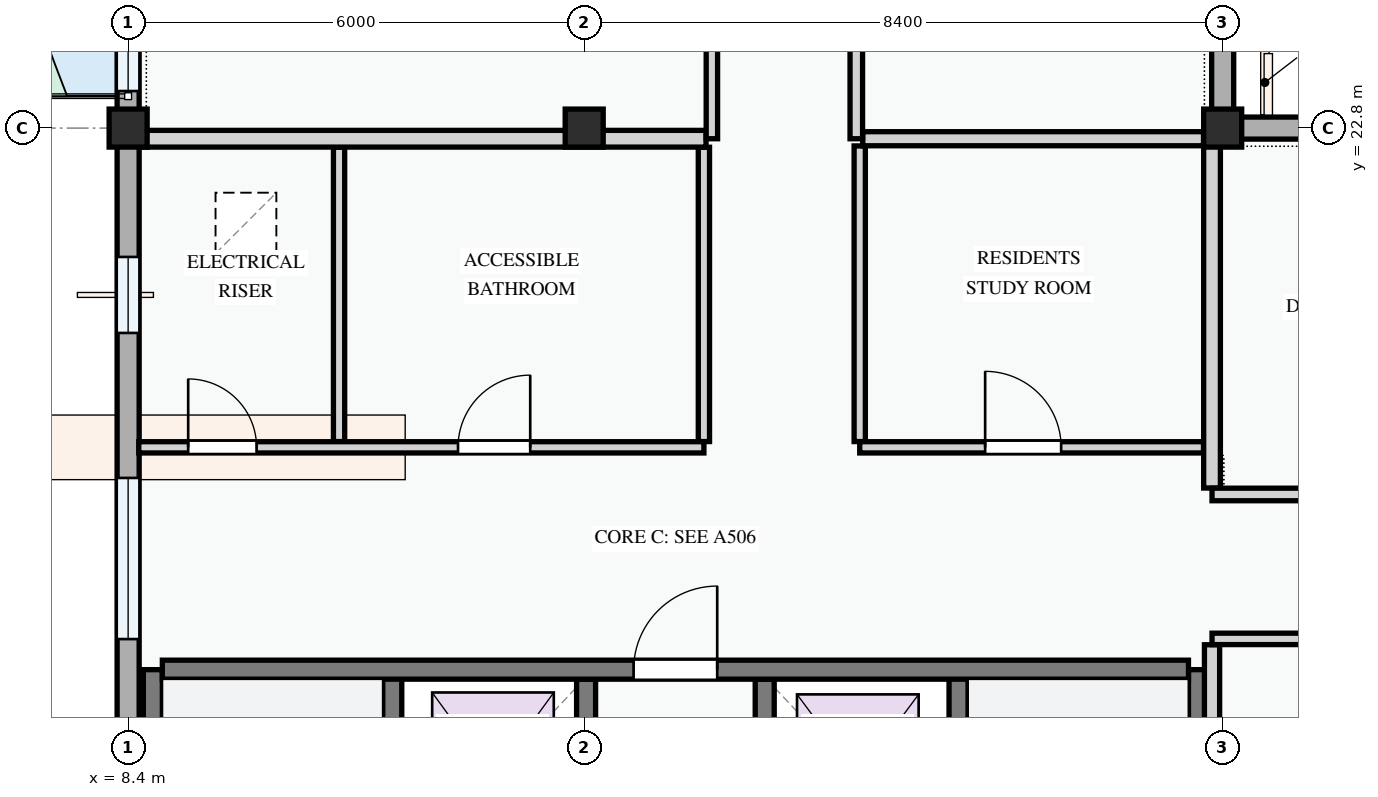
"""IFC4 building model, lengths in metres.
Left out: names, types, materials, properties, quantities, classifications, styles, units other than length and angle.
Written with IfcOpenShell. Run it as: python <this file> out.ifc"""

import sys

from ifc_helpers import new_model, si_unit, direction, frame, frame_2d, origin, origin_2d, place, context, subcontext, project, spatial, rectangle, extrude, element, fill, save


model = new_model("IFC4")
c1 = context("Model", 3, precision=1e-05, world=origin(), true_north=direction((0.0, 1.0)))
c2 = subcontext(c1, "Body", "Model", "MODEL_VIEW")
j1 = project(units=[si_unit("LENGTHUNIT", "METRE"), si_unit("PLANEANGLEUNIT", "RADIAN")], contexts=[c1])
p1 = place(None, origin())
s1 = spatial("IfcSite", under=j1, at=p1, CompositionType="ELEMENT")
p2 = place(p1, origin())
s2 = spatial("IfcBuilding", under=s1, at=p2, CompositionType="ELEMENT")
p3 = place(p2, frame((0.0, 0.0, 21.3)))
s3 = spatial("IfcBuildingStorey", under=s2, at=p3, CompositionType="ELEMENT", Elevation=21.3)
for number, where, z_axis, x_axis in (
    (1, (8.4, 22.8, 0.0), (0.0, 0.0, 1.0), (1.0, 0.0, 0.0)),
    (2, (14.4, 22.8, 0.0), (0.0, 0.0, 1.0), (1.0, 0.0, 0.0)),
    (3, (22.8, 22.8, 0.0), (0.0, 0.0, 1.0), (1.0, 0.0, 0.0)),
):
    element("IfcColumn", number, at=place(p3, frame(where, z_axis=z_axis, x_axis=x_axis)), inside=s3, PredefinedType="COLUMN", context=c2, shape_type="SweptSolid", body=[
        extrude(rectangle(XDim=0.5, YDim=0.5, at=origin_2d()), origin(), (0.0, 0.0, 1.0), 3.3),
    ])
p4 = place(p3, frame((22.8, 22.8, 0.0), z_axis=(0.0, 0.0, 1.0), x_axis=(0.0, 1.0, 0.0)))
e4 = element("IfcWall", 4, at=p4, inside=s3, PredefinedType="STANDARD", context=c2, shape_type="SweptSolid", body=[
    extrude(rectangle(XDim=6.0, YDim=0.29, at=frame_2d((3.0, 0.0))), origin(), (0.0, 0.0, 1.0), 2.575),
])
p5 = place(p4, frame((1.745, 0.0, 0.78)))
e5 = element("IfcOpeningElement", 5, at=p5, cuts=e4, PredefinedType="OPENING", context=c2, shape_type="SweptSolid", body=[
    extrude(rectangle(XDim=0.95, YDim=1.15, at=frame_2d((0.475, 0.575))), frame((0.0, 0.155, 0.0), z_axis=(0.0, -1.0, 0.0), x_axis=(1.0, 0.0, 0.0)), (0.0, 0.0, 1.0), 0.31),
])
p6 = place(p4, frame((4.53, 0.0, 0.78)))
e6 = element("IfcOpeningElement", 6, at=p6, cuts=e4, PredefinedType="OPENING", context=c2, shape_type="SweptSolid", body=[
    extrude(rectangle(XDim=1.0, YDim=1.25, at=frame_2d((0.5, 0.625))), frame((0.0, 0.155, 0.0), z_axis=(0.0, -1.0, 0.0), x_axis=(1.0, 0.0, 0.0)), (0.0, 0.0, 1.0), 0.31),
])
p7 = place(p3, frame((8.4, 28.8, 0.0), z_axis=(0.0, 0.0, 1.0), x_axis=(0.0, -1.0, 0.0)))
e7 = element("IfcWall", 7, at=p7, inside=s3, PredefinedType="STANDARD", context=c2, shape_type="SweptSolid", body=[
    extrude(rectangle(XDim=6.0, YDim=0.29, at=frame_2d((3.0, 0.0))), origin(), (0.0, 0.0, 1.0), 2.445),
])
p8 = place(p7, frame((2.085, 0.0, 0.0)))
e8 = element("IfcOpeningElement", 8, at=p8, cuts=e7, PredefinedType="OPENING", context=c2, shape_type="SweptSolid", body=[
    extrude(rectangle(XDim=1.6, YDim=2.2, at=frame_2d((0.8, 1.1))), frame((0.0, 0.155, 0.0), z_axis=(0.0, -1.0, 0.0), x_axis=(1.0, 0.0, 0.0)), (0.0, 0.0, 1.0), 0.31),
])
p9 = place(p7, frame((0.522, 0.0, 0.78)))
e9 = element("IfcOpeningElement", 9, at=p9, cuts=e7, PredefinedType="OPENING", context=c2, shape_type="SweptSolid", body=[
    extrude(rectangle(XDim=0.9, YDim=1.2, at=frame_2d((0.45, 0.6))), frame((0.0, 0.155, 0.0), z_axis=(0.0, -1.0, 0.0), x_axis=(1.0, 0.0, 0.0)), (0.0, 0.0, 1.0), 0.31),
])
p10 = place(p7, frame((4.032, 0.0, 0.78)))
e10 = element("IfcOpeningElement", 10, at=p10, cuts=e7, PredefinedType="OPENING", context=c2, shape_type="SweptSolid", body=[
    extrude(rectangle(XDim=1.48, YDim=1.52, at=frame_2d((0.74, 0.76))), frame((0.0, 0.155, 0.0), z_axis=(0.0, -1.0, 0.0), x_axis=(1.0, 0.0, 0.0)), (0.0, 0.0, 1.0), 0.31),
])
p11 = place(p3, frame((8.4, 22.8, 0.0), z_axis=(0.0, 0.0, 1.0), x_axis=(0.0, -1.0, 0.0)))
e11 = element("IfcWall", 11, at=p11, inside=s3, PredefinedType="STANDARD", context=c2, shape_type="SweptSolid", body=[
    extrude(rectangle(XDim=8.4, YDim=0.29, at=frame_2d((4.2, 0.0))), origin(), (0.0, 0.0, 1.0), 2.345),
])
p12 = place(p11, frame((1.695, 0.0, 0.78)))
e12 = element("IfcOpeningElement", 12, at=p12, cuts=e11, PredefinedType="OPENING", context=c2, shape_type="SweptSolid", body=[
    extrude(rectangle(XDim=1.0, YDim=1.25, at=frame_2d((0.5, 0.625))), frame((0.0, 0.155, 0.0), z_axis=(0.0, -1.0, 0.0), x_axis=(1.0, 0.0, 0.0)), (0.0, 0.0, 1.0), 0.31),
])
p13 = place(p11, frame((4.603, 0.0, 0.78)))
e13 = element("IfcOpeningElement", 13, at=p13, cuts=e11, PredefinedType="OPENING", context=c2, shape_type="SweptSolid", body=[
    extrude(rectangle(XDim=2.12, YDim=1.44, at=frame_2d((1.06, 0.72))), frame((0.0, 0.155, 0.0), z_axis=(0.0, -1.0, 0.0), x_axis=(1.0, 0.0, 0.0)), (0.0, 0.0, 1.0), 0.31),
])
p14 = place(p3, frame((28.8, 22.8, 0.0), z_axis=(0.0, 0.0, 1.0), x_axis=(-1.0, 0.0, 0.0)))
e14 = element("IfcWall", 14, at=p14, inside=s3, PredefinedType="STANDARD", context=c2, shape_type="SweptSolid", body=[
    extrude(rectangle(XDim=6.0, YDim=0.29, at=frame_2d((3.0, 0.0))), origin(), (0.0, 0.0, 1.0), 2.475),
])
p15 = place(p14, frame((0.495, 0.0, 0.78)))
e15 = element("IfcOpeningElement", 15, at=p15, cuts=e14, PredefinedType="OPENING", context=c2, shape_type="SweptSolid", body=[
    extrude(rectangle(XDim=0.95, YDim=1.15, at=frame_2d((0.475, 0.575))), frame((0.0, 0.155, 0.0), z_axis=(0.0, -1.0, 0.0), x_axis=(1.0, 0.0, 0.0)), (0.0, 0.0, 1.0), 0.31),
])
p16 = place(p14, frame((3.205, 0.0, 0.78)))
e16 = element("IfcOpeningElement", 16, at=p16, cuts=e14, PredefinedType="OPENING", context=c2, shape_type="SweptSolid", body=[
    extrude(rectangle(XDim=1.15, YDim=1.25, at=frame_2d((0.575, 0.625))), frame((0.0, 0.155, 0.0), z_axis=(0.0, -1.0, 0.0), x_axis=(1.0, 0.0, 0.0)), (0.0, 0.0, 1.0), 0.31),
])
p17 = place(p3, frame((11.875, 8.75, 0.0), z_axis=(0.0, 0.0, 1.0), x_axis=(0.0, 1.0, 0.0)))
e17 = element("IfcWall", 17, at=p17, inside=s3, PredefinedType="SHEAR", context=c2, shape_type="SweptSolid", body=[
    extrude(rectangle(XDim=6.925, YDim=0.25, at=frame_2d((3.462, 0.0))), origin(), (0.0, 0.0, 1.0), 3.0),
])
p18 = place(p17, frame((0.35, 0.0, 0.0)))
e18 = element("IfcOpeningElement", 18, at=p18, cuts=e17, PredefinedType="OPENING", context=c2, shape_type="SweptSolid", body=[
    extrude(rectangle(XDim=0.95, YDim=2.1, at=frame_2d((0.475, 1.05))), frame((0.0, 0.135, 0.0), z_axis=(0.0, -1.0, 0.0), x_axis=(1.0, 0.0, 0.0)), (0.0, 0.0, 1.0), 0.27),
])
p19 = place(p3, frame((8.725, 8.6, 0.0), z_axis=(0.0, 0.0, 1.0), x_axis=(0.0, 1.0, 0.0)))
e19 = element("IfcWall", 19, at=p19, inside=s3, PredefinedType="SHEAR", context=c2, shape_type="SweptSolid", body=[
    extrude(rectangle(XDim=7.075, YDim=0.25, at=frame_2d((3.538, 0.0))), origin(), (0.0, 0.0, 1.0), 3.0),
])
p20 = place(p3, frame((22.475, 8.75, 0.0), z_axis=(0.0, 0.0, 1.0), x_axis=(0.0, 1.0, 0.0)))
e20 = element("IfcWall", 20, at=p20, inside=s3, PredefinedType="SHEAR", context=c2, shape_type="SweptSolid", body=[
    extrude(rectangle(XDim=6.925, YDim=0.25, at=frame_2d((3.462, 0.0))), origin(), (0.0, 0.0, 1.0), 3.0),
])
p21 = place(p3, frame((19.325, 8.75, 0.0), z_axis=(0.0, 0.0, 1.0), x_axis=(0.0, 1.0, 0.0)))
e21 = element("IfcWall", 21, at=p21, inside=s3, PredefinedType="SHEAR", context=c2, shape_type="SweptSolid", body=[
    extrude(rectangle(XDim=6.925, YDim=0.25, at=frame_2d((3.462, 0.0))), origin(), (0.0, 0.0, 1.0), 3.0),
])
p22 = place(p21, frame((0.35, 0.0, 0.0)))
e22 = element("IfcOpeningElement", 22, at=p22, cuts=e21, PredefinedType="OPENING", context=c2, shape_type="SweptSolid", body=[
    extrude(rectangle(XDim=0.95, YDim=2.1, at=frame_2d((0.475, 1.05))), frame((0.0, 0.135, 0.0), z_axis=(0.0, -1.0, 0.0), x_axis=(1.0, 0.0, 0.0)), (0.0, 0.0, 1.0), 0.27),
])
for number, where, z_axis, x_axis in (
    (23, (14.425, 13.125, 0.0), (0.0, 0.0, 1.0), (0.0, 1.0, 0.0)),
    (24, (16.775, 13.125, 0.0), (0.0, 0.0, 1.0), (0.0, 1.0, 0.0)),
):
    element("IfcWall", number, at=place(p3, frame(where, z_axis=z_axis, x_axis=x_axis)), inside=s3, PredefinedType="SHEAR", context=c2, shape_type="SweptSolid", body=[
        extrude(rectangle(XDim=2.425, YDim=0.25, at=frame_2d((1.212, 0.0))), origin(), (0.0, 0.0, 1.0), 3.0),
    ])
p23 = place(p3, frame((8.85, 15.675, 0.0), z_axis=(0.0, 0.0, 1.0), x_axis=(1.0, 0.0, 0.0)))
e25 = element("IfcWall", 25, at=p23, inside=s3, PredefinedType="SHEAR", context=c2, shape_type="SweptSolid", body=[
    extrude(rectangle(XDim=13.5, YDim=0.25, at=frame_2d((6.75, 0.0))), origin(), (0.0, 0.0, 1.0), 3.0),
])
p24 = place(p23, frame((6.2, 0.0, 0.0)))
e26 = element("IfcOpeningElement", 26, at=p24, cuts=e25, PredefinedType="OPENING", context=c2, shape_type="SweptSolid", body=[
    extrude(rectangle(XDim=1.1, YDim=2.15, at=frame_2d((0.55, 1.075))), frame((0.0, 0.135, 0.0), z_axis=(0.0, -1.0, 0.0), x_axis=(1.0, 0.0, 0.0)), (0.0, 0.0, 1.0), 0.27),
])
for number, where, z_axis, x_axis in (
    (27, (11.175, 18.676, 0.0), (0.0, 0.0, 1.0), (0.0, 1.0, 0.0)),
    (28, (15.975, 18.676, 0.0), (0.0, 0.0, 1.0), (0.0, 1.0, 0.0)),
):
    element("IfcWall", number, at=place(p3, frame(where, z_axis=z_axis, x_axis=x_axis)), inside=s3, PredefinedType="PARTITIONING", context=c2, shape_type="SweptSolid", body=[
        extrude(rectangle(XDim=3.872, YDim=0.148, at=frame_2d((1.936, 0.0))), origin(), (0.0, 0.0, 1.0), 3.0),
    ])
p25 = place(p3, frame((18.025, 18.676, 0.0), z_axis=(0.0, 0.0, 1.0), x_axis=(0.0, 1.0, 0.0)))
e29 = element("IfcWall", 29, at=p25, inside=s3, PredefinedType="PARTITIONING", context=c2, shape_type="SweptSolid", body=[
    extrude(rectangle(XDim=3.889, YDim=0.148, at=frame_2d((1.945, 0.0))), origin(), (0.0, 0.0, 1.0), 3.0),
])
p26 = place(p3, frame((8.54, 18.6, 0.0), z_axis=(0.0, 0.0, 1.0), x_axis=(1.0, 0.0, 0.0)))
e30 = element("IfcWall", 30, at=p26, inside=s3, PredefinedType="PARTITIONING", context=c2, shape_type="SweptSolid", body=[
    extrude(rectangle(XDim=7.435, YDim=0.148, at=frame_2d((3.718, 0.0))), origin(), (0.0, 0.0, 1.0), 3.0),
])
p27 = place(p26, frame((0.65, 0.0, 0.0)))
e31 = element("IfcOpeningElement", 31, at=p27, cuts=e30, PredefinedType="OPENING", context=c2, shape_type="SweptSolid", body=[
    extrude(rectangle(XDim=0.9, YDim=2.1, at=frame_2d((0.45, 1.05))), frame((0.0, 0.084, 0.0), z_axis=(0.0, -1.0, 0.0), x_axis=(1.0, 0.0, 0.0)), (0.0, 0.0, 1.0), 0.168),
])
p28 = place(p26, frame((4.2, 0.0, 0.0)))
e32 = element("IfcOpeningElement", 32, at=p28, cuts=e30, PredefinedType="OPENING", context=c2, shape_type="SweptSolid", body=[
    extrude(rectangle(XDim=0.95, YDim=2.1, at=frame_2d((0.475, 1.05))), frame((0.0, 0.084, 0.0), z_axis=(0.0, -1.0, 0.0), x_axis=(1.0, 0.0, 0.0)), (0.0, 0.0, 1.0), 0.168),
])
p29 = place(p3, frame((18.025, 18.6, 0.0), z_axis=(0.0, 0.0, 1.0), x_axis=(1.0, 0.0, 0.0)))
e33 = element("IfcWall", 33, at=p29, inside=s3, PredefinedType="PARTITIONING", context=c2, shape_type="SweptSolid", body=[
    extrude(rectangle(XDim=4.523, YDim=0.148, at=frame_2d((2.262, 0.0))), origin(), (0.0, 0.0, 1.0), 3.0),
])
p30 = place(p29, frame((1.65, 0.0, 0.0)))
e34 = element("IfcOpeningElement", 34, at=p30, cuts=e33, PredefinedType="OPENING", context=c2, shape_type="SweptSolid", body=[
    extrude(rectangle(XDim=1.0, YDim=2.15, at=frame_2d((0.5, 1.075))), frame((0.0, 0.084, 0.0), z_axis=(0.0, -1.0, 0.0), x_axis=(1.0, 0.0, 0.0)), (0.0, 0.0, 1.0), 0.168),
])
p31 = place(p3, frame((8.547, 22.66, 0.0), z_axis=(0.0, 0.0, 1.0), x_axis=(1.0, 0.0, 0.0)))
e35 = element("IfcWall", 35, at=p31, inside=s3, PredefinedType="PARTITIONING", context=c2, shape_type="SweptSolid", body=[
    extrude(rectangle(XDim=7.456, YDim=0.22, at=frame_2d((3.728, 0.0))), origin(), (0.0, 0.0, 1.0), 2.375),
])
p32 = place(p3, frame((18.064, 22.66, 0.0), z_axis=(0.0, 0.0, 1.0), x_axis=(1.0, 0.0, 0.0)))
e36 = element("IfcWall", 36, at=p32, inside=s3, PredefinedType="PARTITIONING", context=c2, shape_type="SweptSolid", body=[
    extrude(rectangle(XDim=4.484, YDim=0.185, at=frame_2d((2.242, 0.0))), origin(), (0.0, 0.0, 1.0), 2.375),
])
p33 = place(p3, frame((16.08, 22.66, 0.0), z_axis=(0.0, 0.0, 1.0), x_axis=(0.0, 1.0, 0.0)))
e37 = element("IfcWall", 37, at=p33, inside=s3, PredefinedType="PARTITIONING", context=c2, shape_type="SweptSolid", body=[
    extrude(rectangle(XDim=34.793, YDim=0.15, at=frame_2d((17.396, 0.0))), origin(), (0.0, 0.0, 1.0), 3.0),
])
p34 = place(p33, frame((2.627, 0.0, 0.0)))
e38 = element("IfcOpeningElement", 38, at=p34, cuts=e37, PredefinedType="OPENING", context=c2, shape_type="SweptSolid", body=[
    extrude(rectangle(XDim=0.92, YDim=2.1, at=frame_2d((0.46, 1.05))), frame((0.0, 0.085, 0.0), z_axis=(0.0, -1.0, 0.0), x_axis=(1.0, 0.0, 0.0)), (0.0, 0.0, 1.0), 0.17),
])
p35 = place(p33, frame((10.02, 0.0, 0.0)))
e39 = element("IfcOpeningElement", 39, at=p35, cuts=e37, PredefinedType="OPENING", context=c2, shape_type="SweptSolid", body=[
    extrude(rectangle(XDim=0.92, YDim=2.1, at=frame_2d((0.46, 1.05))), frame((0.0, 0.085, 0.0), z_axis=(0.0, -1.0, 0.0), x_axis=(1.0, 0.0, 0.0)), (0.0, 0.0, 1.0), 0.17),
])
p36 = place(p33, frame((24.355, 0.0, 0.0)))
e40 = element("IfcOpeningElement", 40, at=p36, cuts=e37, PredefinedType="OPENING", context=c2, shape_type="SweptSolid", body=[
    extrude(rectangle(XDim=0.92, YDim=2.1, at=frame_2d((0.46, 1.05))), frame((0.0, 0.085, 0.0), z_axis=(0.0, -1.0, 0.0), x_axis=(1.0, 0.0, 0.0)), (0.0, 0.0, 1.0), 0.17),
])
p37 = place(p3, frame((17.98, 22.66, 0.0), z_axis=(0.0, 0.0, 1.0), x_axis=(0.0, 1.0, 0.0)))
e41 = element("IfcWall", 41, at=p37, inside=s3, PredefinedType="PARTITIONING", context=c2, shape_type="SweptSolid", body=[
    extrude(rectangle(XDim=34.793, YDim=0.165, at=frame_2d((17.396, 0.0))), origin(), (0.0, 0.0, 1.0), 3.0),
])
p38 = place(p37, frame((2.63, 0.0, 0.0)))
e42 = element("IfcOpeningElement", 42, at=p38, cuts=e41, PredefinedType="OPENING", context=c2, shape_type="SweptSolid", body=[
    extrude(rectangle(XDim=0.96, YDim=2.12, at=frame_2d((0.48, 1.06))), frame((0.0, 0.093, 0.0), z_axis=(0.0, -1.0, 0.0), x_axis=(1.0, 0.0, 0.0)), (0.0, 0.0, 1.0), 0.185),
])
p39 = place(p37, frame((10.02, 0.0, 0.0)))
e43 = element("IfcOpeningElement", 43, at=p39, cuts=e41, PredefinedType="OPENING", context=c2, shape_type="SweptSolid", body=[
    extrude(rectangle(XDim=0.92, YDim=2.1, at=frame_2d((0.46, 1.05))), frame((0.0, 0.093, 0.0), z_axis=(0.0, -1.0, 0.0), x_axis=(1.0, 0.0, 0.0)), (0.0, 0.0, 1.0), 0.185),
])
p40 = place(p37, frame((24.289, 0.0, 0.0)))
e44 = element("IfcOpeningElement", 44, at=p40, cuts=e41, PredefinedType="OPENING", context=c2, shape_type="SweptSolid", body=[
    extrude(rectangle(XDim=0.92, YDim=2.1, at=frame_2d((0.46, 1.05))), frame((0.0, 0.093, 0.0), z_axis=(0.0, -1.0, 0.0), x_axis=(1.0, 0.0, 0.0)), (0.0, 0.0, 1.0), 0.185),
])
p41 = place(p3, frame((22.66, 8.547, 0.0), z_axis=(0.0, 0.0, 1.0), x_axis=(0.0, 1.0, 0.0)))
e45 = element("IfcWall", 45, at=p41, inside=s3, PredefinedType="PARTITIONING", context=c2, shape_type="SweptSolid", body=[
    extrude(rectangle(XDim=7.456, YDim=0.2, at=frame_2d((3.728, 0.0))), origin(), (0.0, 0.0, 1.0), 2.425),
])
p42 = place(p3, frame((22.66, 18.064, 0.0), z_axis=(0.0, 0.0, 1.0), x_axis=(0.0, 1.0, 0.0)))
e46 = element("IfcWall", 46, at=p42, inside=s3, PredefinedType="PARTITIONING", context=c2, shape_type="SweptSolid", body=[
    extrude(rectangle(XDim=4.676, YDim=0.22, at=frame_2d((2.338, 0.0))), origin(), (0.0, 0.0, 1.0), 2.425),
])
p43 = place(p3, frame((22.66, 16.08, 0.0), z_axis=(0.0, 0.0, 1.0), x_axis=(1.0, 0.0, 0.0)))
e47 = element("IfcWall", 47, at=p43, inside=s3, PredefinedType="PARTITIONING", context=c2, shape_type="SweptSolid", body=[
    extrude(rectangle(XDim=34.793, YDim=0.15, at=frame_2d((17.396, 0.0))), origin(), (0.0, 0.0, 1.0), 3.0),
])
p44 = place(p43, frame((2.627, 0.0, 0.0)))
e48 = element("IfcOpeningElement", 48, at=p44, cuts=e47, PredefinedType="OPENING", context=c2, shape_type="SweptSolid", body=[
    extrude(rectangle(XDim=0.92, YDim=2.1, at=frame_2d((0.46, 1.05))), frame((0.0, 0.085, 0.0), z_axis=(0.0, -1.0, 0.0), x_axis=(1.0, 0.0, 0.0)), (0.0, 0.0, 1.0), 0.17),
])
p45 = place(p43, frame((10.02, 0.0, 0.0)))
e49 = element("IfcOpeningElement", 49, at=p45, cuts=e47, PredefinedType="OPENING", context=c2, shape_type="SweptSolid", body=[
    extrude(rectangle(XDim=0.92, YDim=2.1, at=frame_2d((0.46, 1.05))), frame((0.0, 0.085, 0.0), z_axis=(0.0, -1.0, 0.0), x_axis=(1.0, 0.0, 0.0)), (0.0, 0.0, 1.0), 0.17),
])
p46 = place(p43, frame((24.355, 0.0, 0.0)))
e50 = element("IfcOpeningElement", 50, at=p46, cuts=e47, PredefinedType="OPENING", context=c2, shape_type="SweptSolid", body=[
    extrude(rectangle(XDim=0.92, YDim=2.1, at=frame_2d((0.46, 1.05))), frame((0.0, 0.085, 0.0), z_axis=(0.0, -1.0, 0.0), x_axis=(1.0, 0.0, 0.0)), (0.0, 0.0, 1.0), 0.17),
])
p47 = place(p3, frame((22.66, 17.98, 0.0), z_axis=(0.0, 0.0, 1.0), x_axis=(1.0, 0.0, 0.0)))
e51 = element("IfcWall", 51, at=p47, inside=s3, PredefinedType="PARTITIONING", context=c2, shape_type="SweptSolid", body=[
    extrude(rectangle(XDim=34.793, YDim=0.165, at=frame_2d((17.396, 0.0))), origin(), (0.0, 0.0, 1.0), 3.0),
])
p48 = place(p47, frame((2.63, 0.0, 0.0)))
e52 = element("IfcOpeningElement", 52, at=p48, cuts=e51, PredefinedType="OPENING", context=c2, shape_type="SweptSolid", body=[
    extrude(rectangle(XDim=0.92, YDim=2.1, at=frame_2d((0.46, 1.05))), frame((0.0, 0.093, 0.0), z_axis=(0.0, -1.0, 0.0), x_axis=(1.0, 0.0, 0.0)), (0.0, 0.0, 1.0), 0.185),
])
p49 = place(p47, frame((10.02, 0.0, 0.0)))
e53 = element("IfcOpeningElement", 53, at=p49, cuts=e51, PredefinedType="OPENING", context=c2, shape_type="SweptSolid", body=[
    extrude(rectangle(XDim=0.96, YDim=2.12, at=frame_2d((0.48, 1.06))), frame((0.0, 0.093, 0.0), z_axis=(0.0, -1.0, 0.0), x_axis=(1.0, 0.0, 0.0)), (0.0, 0.0, 1.0), 0.185),
])
p50 = place(p47, frame((24.289, 0.0, 0.0)))
e54 = element("IfcOpeningElement", 54, at=p50, cuts=e51, PredefinedType="OPENING", context=c2, shape_type="SweptSolid", body=[
    extrude(rectangle(XDim=0.92, YDim=2.1, at=frame_2d((0.46, 1.05))), frame((0.0, 0.093, 0.0), z_axis=(0.0, -1.0, 0.0), x_axis=(1.0, 0.0, 0.0)), (0.0, 0.0, 1.0), 0.185),
])
p51 = place(p10, origin())
e55 = element("IfcWindow", 55, at=p51, inside=s3, PartitioningType="SINGLE_PANEL", PredefinedType="WINDOW", context=c2, shape_type="SweptSolid", body=[
    extrude(rectangle(XDim=1.48, YDim=1.52, at=frame_2d((0.74, 0.76))), frame((0.0, 0.03, 0.0), z_axis=(0.0, -1.0, 0.0), x_axis=(1.0, 0.0, 0.0)), (0.0, 0.0, 1.0), 0.06),
])
fill(e10, e55)
p52 = place(p12, origin())
e56 = element("IfcWindow", 56, at=p52, inside=s3, PartitioningType="SINGLE_PANEL", PredefinedType="WINDOW", context=c2, shape_type="SweptSolid", body=[
    extrude(rectangle(XDim=1.0, YDim=1.25, at=frame_2d((0.5, 0.625))), frame((0.0, 0.03, 0.0), z_axis=(0.0, -1.0, 0.0), x_axis=(1.0, 0.0, 0.0)), (0.0, 0.0, 1.0), 0.06),
])
fill(e12, e56)
p53 = place(p13, origin())
e57 = element("IfcWindow", 57, at=p53, inside=s3, PartitioningType="DOUBLE_PANEL_VERTICAL", PredefinedType="WINDOW", context=c2, shape_type="SweptSolid", body=[
    extrude(rectangle(XDim=2.12, YDim=1.44, at=frame_2d((1.06, 0.72))), frame((0.0, 0.03, 0.0), z_axis=(0.0, -1.0, 0.0), x_axis=(1.0, 0.0, 0.0)), (0.0, 0.0, 1.0), 0.06),
])
fill(e13, e57)
p54 = place(p24, origin())
e58 = element("IfcDoor", 58, at=p54, inside=s3, OperationType="SINGLE_SWING_RIGHT", PredefinedType="DOOR", context=c2, shape_type="SweptSolid", body=[
    extrude(rectangle(XDim=1.1, YDim=2.15, at=frame_2d((0.55, 1.075))), frame((0.0, 0.025, 0.0), z_axis=(0.0, -1.0, 0.0), x_axis=(1.0, 0.0, 0.0)), (0.0, 0.0, 1.0), 0.05),
])
fill(e26, e58)
p55 = place(p27, origin())
e59 = element("IfcDoor", 59, at=p55, inside=s3, OperationType="SINGLE_SWING_LEFT", PredefinedType="DOOR", context=c2, shape_type="SweptSolid", body=[
    extrude(rectangle(XDim=0.9, YDim=2.1, at=frame_2d((0.45, 1.05))), frame((0.0, 0.025, 0.0), z_axis=(0.0, -1.0, 0.0), x_axis=(1.0, 0.0, 0.0)), (0.0, 0.0, 1.0), 0.05),
])
fill(e31, e59)
p56 = place(p28, origin())
e60 = element("IfcDoor", 60, at=p56, inside=s3, OperationType="SINGLE_SWING_RIGHT", PredefinedType="DOOR", context=c2, shape_type="SweptSolid", body=[
    extrude(rectangle(XDim=0.95, YDim=2.1, at=frame_2d((0.475, 1.05))), frame((0.0, 0.025, 0.0), z_axis=(0.0, -1.0, 0.0), x_axis=(1.0, 0.0, 0.0)), (0.0, 0.0, 1.0), 0.05),
])
fill(e32, e60)
p57 = place(p30, origin())
e61 = element("IfcDoor", 61, at=p57, inside=s3, OperationType="SINGLE_SWING_LEFT", PredefinedType="DOOR", context=c2, shape_type="SweptSolid", body=[
    extrude(rectangle(XDim=1.0, YDim=2.15, at=frame_2d((0.5, 1.075))), frame((0.0, 0.025, 0.0), z_axis=(0.0, -1.0, 0.0), x_axis=(1.0, 0.0, 0.0)), (0.0, 0.0, 1.0), 0.05),
])
fill(e34, e61)
save(model, sys.argv[1])
